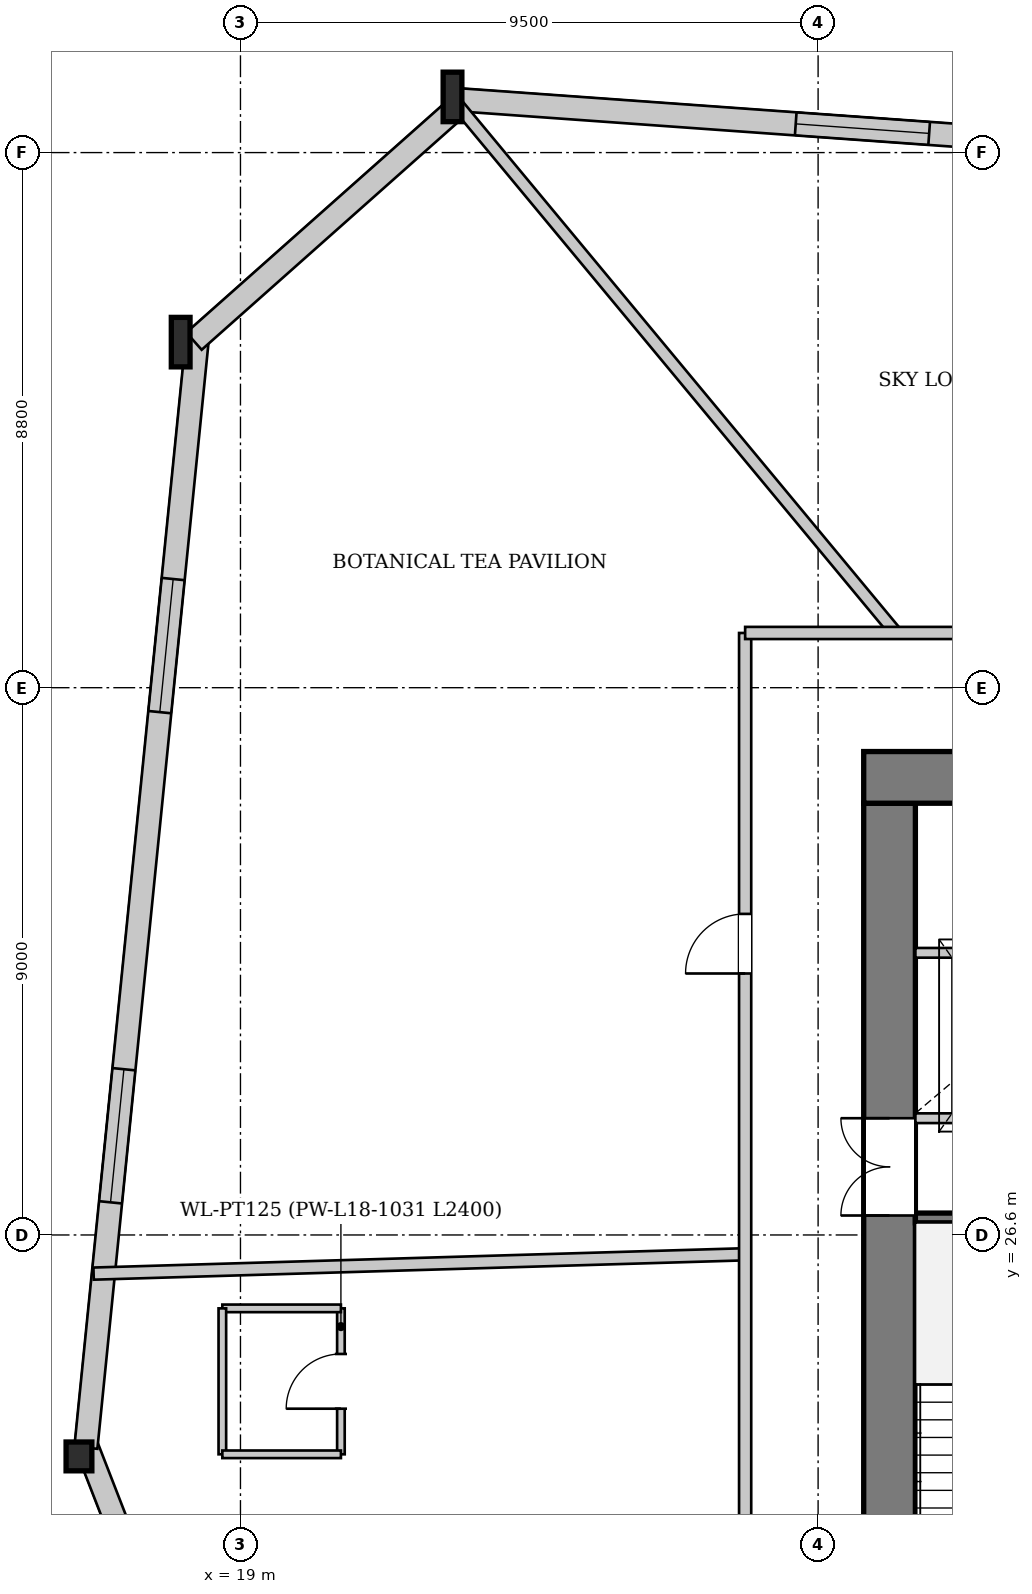
"""IFC4 building model, lengths in metres.
Left out: names, types, materials, properties, quantities, classifications, styles, units other than length and angle.
Written with IfcOpenShell. Run it as: python <this file> out.ifc"""

import sys

from ifc_helpers import new_model, si_unit, direction, frame, frame_2d, origin, origin_2d, place, context, subcontext, project, spatial, rectangle, i_section, extrude, source, transform, mapped, element, fill, save


model = new_model("IFC4")
c1 = context("Model", 3, precision=1e-05, world=origin(), true_north=direction((0.0, 1.0)))
c2 = subcontext(c1, "Body", "Model", "MODEL_VIEW")
j1 = project(units=[si_unit("LENGTHUNIT", "METRE"), si_unit("PLANEANGLEUNIT", "RADIAN")], contexts=[c1])
p1 = place(None, origin())
s1 = spatial("IfcSite", under=j1, at=p1, CompositionType="ELEMENT")
p2 = place(p1, origin())
s2 = spatial("IfcBuilding", under=s1, at=p2, CompositionType="ELEMENT")
p3 = place(p2, frame((0.0, 0.0, 71.9)))
s3 = spatial("IfcBuildingStorey", under=s2, at=p3, CompositionType="ELEMENT", Elevation=71.9)
m1 = source(origin(), c2, "Body", "SweptSolid", [
    extrude(i_section(OverallWidth=0.308, OverallDepth=0.814, WebThickness=0.021, FlangeThickness=0.04, at=origin_2d()), origin(), (0.0, 0.0, 1.0), 3.856),
])
p4 = place(p3, frame((22.632, 45.456, 0.0), z_axis=(-0.07483088436, -0.073058240738, 0.994516381065), x_axis=(0.698581004946, -0.715530977337, 0.0)))
e1 = element("IfcColumn", 1, at=p4, inside=s3, PredefinedType="COLUMN", context=c2, shape_type="MappedRepresentation", body=[
    mapped(m1, transform((0.0, 0.0, 0.0), x_axis=(1.0, 0.0, 0.0), y_axis=(0.0, 1.0, 0.0), z_axis=(0.0, 0.0, 1.0), scale=1.0)),
])
m2 = source(origin(), c2, "Body", "SweptSolid", [
    extrude(i_section(OverallWidth=0.308, OverallDepth=0.814, WebThickness=0.021, FlangeThickness=0.04, at=origin_2d()), origin(), (0.0, 0.0, 1.0), 3.853),
])
p5 = place(p3, frame((18.11, 41.441, 0.0), z_axis=(-0.048286594002, -0.082125230744, 0.995451581602), x_axis=(0.862036791627, -0.506845706188, 0.0)))
e2 = element("IfcColumn", 2, at=p5, inside=s3, PredefinedType="COLUMN", context=c2, shape_type="MappedRepresentation", body=[
    mapped(m2, transform((0.0, 0.0, 0.0), x_axis=(1.0, 0.0, 0.0), y_axis=(0.0, 1.0, 0.0), z_axis=(0.0, 0.0, 1.0), scale=1.0)),
])
m3 = source(origin(), c2, "Body", "SweptSolid", [
    extrude(i_section(OverallWidth=0.424, OverallDepth=0.474, WebThickness=0.043, FlangeThickness=0.068, at=origin_2d()), origin(), (0.0, 0.0, 1.0), 3.852),
])
p6 = place(p3, frame((16.269, 23.121, 0.0), z_axis=(0.039042769409, -0.084550412974, 0.995654001058), x_axis=(0.907879691662, 0.419230802147, 0.0)))
e3 = element("IfcColumn", 3, at=p6, inside=s3, PredefinedType="COLUMN", context=c2, shape_type="MappedRepresentation", body=[
    mapped(m3, transform((0.0, 0.0, 0.0), x_axis=(1.0, 0.0, 0.0), y_axis=(0.0, 1.0, 0.0), z_axis=(0.0, 0.0, 1.0), scale=1.0)),
])
p7 = place(p3, frame((23.116, 6.028, 0.0), z_axis=(0.0, 0.0, 1.0), x_axis=(-0.362290127774, 0.932065375023, 0.0)))
e4 = element("IfcWall", 4, at=p7, inside=s3, PredefinedType="SOLIDWALL", context=c2, shape_type="SweptSolid", body=[
    extrude(rectangle(XDim=18.412, YDim=0.38, at=frame_2d((9.206, 0.0))), origin(), (0.0, 0.0, 1.0), 3.042),
])
p8 = place(p7, frame((4.056, 0.0, 0.65)))
e5 = element("IfcOpeningElement", 5, at=p8, cuts=e4, PredefinedType="OPENING", context=c2, shape_type="SweptSolid", body=[
    extrude(rectangle(XDim=2.2, YDim=2.25, at=frame_2d((1.1, 1.125))), frame((0.0, 0.2, 0.0), z_axis=(0.0, -1.0, 0.0), x_axis=(1.0, 0.0, 0.0)), (0.0, 0.0, 1.0), 0.4),
])
p9 = place(p7, frame((12.157, 0.0, 0.65)))
e6 = element("IfcOpeningElement", 6, at=p9, cuts=e4, PredefinedType="OPENING", context=c2, shape_type="SweptSolid", body=[
    extrude(rectangle(XDim=2.2, YDim=2.25, at=frame_2d((1.1, 1.125))), frame((0.0, 0.2, 0.0), z_axis=(0.0, -1.0, 0.0), x_axis=(1.0, 0.0, 0.0)), (0.0, 0.0, 1.0), 0.4),
])
p10 = place(p3, frame((16.458, 23.102, 0.0), z_axis=(0.0, 0.0, 1.0), x_axis=(0.099977641191, 0.994989683998, 0.0)))
e7 = element("IfcWall", 7, at=p10, inside=s3, PredefinedType="SOLIDWALL", context=c2, shape_type="SweptSolid", body=[
    extrude(rectangle(XDim=18.412, YDim=0.38, at=frame_2d((9.206, 0.0))), origin(), (0.0, 0.0, 1.0), 3.042),
])
p11 = place(p10, frame((4.055, 0.0, 0.65)))
e8 = element("IfcOpeningElement", 8, at=p11, cuts=e7, PredefinedType="OPENING", context=c2, shape_type="SweptSolid", body=[
    extrude(rectangle(XDim=2.2, YDim=2.25, at=frame_2d((1.1, 1.125))), frame((0.0, 0.2, 0.0), z_axis=(0.0, -1.0, 0.0), x_axis=(1.0, 0.0, 0.0)), (0.0, 0.0, 1.0), 0.4),
])
p12 = place(p10, frame((12.157, 0.0, 0.65)))
e9 = element("IfcOpeningElement", 9, at=p12, cuts=e7, PredefinedType="OPENING", context=c2, shape_type="SweptSolid", body=[
    extrude(rectangle(XDim=2.2, YDim=2.25, at=frame_2d((1.1, 1.125))), frame((0.0, 0.2, 0.0), z_axis=(0.0, -1.0, 0.0), x_axis=(1.0, 0.0, 0.0)), (0.0, 0.0, 1.0), 0.4),
])
p13 = place(p3, frame((18.236, 41.299, 0.0), z_axis=(0.0, 0.0, 1.0), x_axis=(0.747770050528, 0.663957793488, 0.0)))
e10 = element("IfcWall", 10, at=p13, inside=s3, PredefinedType="SOLIDWALL", context=c2, shape_type="SweptSolid", body=[
    extrude(rectangle(XDim=6.047, YDim=0.38, at=frame_2d((3.024, 0.0))), origin(), (0.0, 0.0, 1.0), 3.042),
])
p14 = place(p3, frame((22.618, 45.267, 0.0), z_axis=(0.0, 0.0, 1.0), x_axis=(0.997450631022, -0.071359923443, 0.0)))
e11 = element("IfcWall", 11, at=p14, inside=s3, PredefinedType="SOLIDWALL", context=c2, shape_type="SweptSolid", body=[
    extrude(rectangle(XDim=23.672, YDim=0.38, at=frame_2d((11.836, 0.0))), origin(), (0.0, 0.0, 1.0), 3.042),
])
p15 = place(p14, frame((5.528, 0.0, 0.65)))
e12 = element("IfcOpeningElement", 12, at=p15, cuts=e11, PredefinedType="OPENING", context=c2, shape_type="SweptSolid", body=[
    extrude(rectangle(XDim=2.2, YDim=2.25, at=frame_2d((1.1, 1.125))), frame((0.0, 0.2, 0.0), z_axis=(0.0, -1.0, 0.0), x_axis=(1.0, 0.0, 0.0)), (0.0, 0.0, 1.0), 0.4),
])
p16 = place(p14, frame((15.944, 0.0, 0.65)))
e13 = element("IfcOpeningElement", 13, at=p16, cuts=e11, PredefinedType="OPENING", context=c2, shape_type="SweptSolid", body=[
    extrude(rectangle(XDim=2.2, YDim=2.25, at=frame_2d((1.1, 1.125))), frame((0.0, 0.2, 0.0), z_axis=(0.0, -1.0, 0.0), x_axis=(1.0, 0.0, 0.0)), (0.0, 0.0, 1.0), 0.4),
])
p17 = place(p3, frame((29.675, 19.5, 0.0), z_axis=(0.0, 0.0, 1.0), x_axis=(0.0, 1.0, 0.0)))
e14 = element("IfcWall", 14, at=p17, inside=s3, PredefinedType="SHEAR", context=c2, shape_type="SweptSolid", body=[
    extrude(rectangle(XDim=14.2, YDim=0.85, at=frame_2d((7.1, 0.0))), origin(), (0.0, 0.0, 1.0), 3.75),
])
p18 = place(p17, frame((7.42, 0.0, 0.0)))
e15 = element("IfcOpeningElement", 15, at=p18, cuts=e14, PredefinedType="OPENING", context=c2, shape_type="SweptSolid", body=[
    extrude(rectangle(XDim=1.6, YDim=2.2, at=frame_2d((0.8, 1.1))), frame((0.0, 0.435, 0.0), z_axis=(0.0, -1.0, 0.0), x_axis=(1.0, 0.0, 0.0)), (0.0, 0.0, 1.0), 0.87),
])
p19 = place(p3, frame((29.25, 34.125, 0.0), z_axis=(0.0, 0.0, 1.0), x_axis=(1.0, 0.0, 0.0)))
e16 = element("IfcWall", 16, at=p19, inside=s3, PredefinedType="SHEAR", context=c2, shape_type="SweptSolid", body=[
    extrude(rectangle(XDim=17.5, YDim=0.85, at=frame_2d((8.75, 0.0))), origin(), (0.0, 0.0, 1.0), 3.75),
])
p20 = place(p19, frame((1.85, 0.0, 0.0)))
e17 = element("IfcOpeningElement", 17, at=p20, cuts=e16, PredefinedType="OPENING", context=c2, shape_type="SweptSolid", body=[
    extrude(rectangle(XDim=0.95, YDim=2.1, at=frame_2d((0.475, 1.05))), frame((0.0, 0.435, 0.0), z_axis=(0.0, -1.0, 0.0), x_axis=(1.0, 0.0, 0.0)), (0.0, 0.0, 1.0), 0.87),
])
p21 = place(p19, frame((4.23, 0.0, 0.0)))
e18 = element("IfcOpeningElement", 18, at=p21, cuts=e16, PredefinedType="OPENING", context=c2, shape_type="SweptSolid", body=[
    extrude(rectangle(XDim=1.32, YDim=2.2, at=frame_2d((0.66, 1.1))), frame((0.0, 0.435, 0.0), z_axis=(0.0, -1.0, 0.0), x_axis=(1.0, 0.0, 0.0)), (0.0, 0.0, 1.0), 0.87),
])
p22 = place(p19, frame((15.3, 0.0, 0.0)))
e19 = element("IfcOpeningElement", 19, at=p22, cuts=e16, PredefinedType="OPENING", context=c2, shape_type="SweptSolid", body=[
    extrude(rectangle(XDim=0.95, YDim=2.1, at=frame_2d((0.475, 1.05))), frame((0.0, 0.435, 0.0), z_axis=(0.0, -1.0, 0.0), x_axis=(1.0, 0.0, 0.0)), (0.0, 0.0, 1.0), 0.87),
])
for number, where, z_axis, x_axis in (
    (20, (30.1, 26.88, 0.0), (0.0, 0.0, 1.0), (1.0, 0.0, 0.0)),
    (21, (30.1, 28.52, 0.0), (0.0, 0.0, 1.0), (1.0, 0.0, 0.0)),
):
    element("IfcWall", number, at=place(p3, frame(where, z_axis=z_axis, x_axis=x_axis)), inside=s3, PredefinedType="PARTITIONING", context=c2, shape_type="SweptSolid", body=[
        extrude(rectangle(XDim=3.02, YDim=0.16, at=frame_2d((1.51, 0.0))), origin(), (0.0, 0.0, 1.0), 3.75),
    ])
p23 = place(p3, frame((30.1, 31.24, 0.0), z_axis=(0.0, 0.0, 1.0), x_axis=(1.0, 0.0, 0.0)))
e22 = element("IfcWall", 22, at=p23, inside=s3, PredefinedType="PARTITIONING", context=c2, shape_type="SweptSolid", body=[
    extrude(rectangle(XDim=3.02, YDim=0.16, at=frame_2d((1.51, 0.0))), origin(), (0.0, 0.0, 1.0), 3.75),
])
p24 = place(p23, frame((0.91, 0.0, 0.0)))
e23 = element("IfcOpeningElement", 23, at=p24, cuts=e22, PredefinedType="OPENING", context=c2, shape_type="SweptSolid", body=[
    extrude(rectangle(XDim=1.2, YDim=2.2, at=frame_2d((0.6, 1.1))), frame((0.0, 0.09, 0.0), z_axis=(0.0, -1.0, 0.0), x_axis=(1.0, 0.0, 0.0)), (0.0, 0.0, 1.0), 0.18),
])
p25 = place(p3, frame((29.781, 36.5, 0.0), z_axis=(0.0, 0.0, 1.0), x_axis=(-0.638776626614, 0.769392241507, 0.0)))
e24 = element("IfcWall", 24, at=p25, inside=s3, PredefinedType="PARTITIONING", context=c2, shape_type="SweptSolid", body=[
    extrude(rectangle(XDim=11.42, YDim=0.2, at=frame_2d((5.71, 0.0))), origin(), (0.0, 0.0, 1.0), 3.245),
])
p26 = place(p3, frame((27.3, 26.282, 0.0), z_axis=(0.0, 0.0, 1.0), x_axis=(-0.999559606693, -0.029674781671, 0.0)))
e25 = element("IfcWall", 25, at=p26, inside=s3, PredefinedType="PARTITIONING", context=c2, shape_type="SweptSolid", body=[
    extrude(rectangle(XDim=10.72, YDim=0.2, at=frame_2d((5.36, 0.0))), origin(), (0.0, 0.0, 1.0), 3.75),
])
p27 = place(p3, frame((20.652, 22.993, 0.0), z_axis=(0.0, 0.0, 1.0), x_axis=(0.0, 1.0, 0.0)))
e26 = element("IfcWall", 26, at=p27, inside=s3, PredefinedType="PARTITIONING", context=c2, shape_type="SweptSolid", body=[
    extrude(rectangle(XDim=2.4, YDim=0.125, at=frame_2d((1.2, 0.0))), origin(), (0.0, 0.0, 1.0), 3.75),
])
p28 = place(p27, frame((0.75, 0.0, 0.0)))
e27 = element("IfcOpeningElement", 27, at=p28, cuts=e26, PredefinedType="OPENING", context=c2, shape_type="SweptSolid", body=[
    extrude(rectangle(XDim=0.9, YDim=2.1, at=frame_2d((0.45, 1.05))), frame((0.0, 0.073, 0.0), z_axis=(0.0, -1.0, 0.0), x_axis=(1.0, 0.0, 0.0)), (0.0, 0.0, 1.0), 0.145),
])
p29 = place(p3, frame((20.652, 25.393, 0.0), z_axis=(0.0, 0.0, 1.0), x_axis=(-1.0, 0.0, 0.0)))
e28 = element("IfcWall", 28, at=p29, inside=s3, PredefinedType="PARTITIONING", context=c2, shape_type="SweptSolid", body=[
    extrude(rectangle(XDim=1.95, YDim=0.125, at=frame_2d((0.975, 0.0))), origin(), (0.0, 0.0, 1.0), 3.75),
])
p30 = place(p3, frame((18.702, 25.393, 0.0), z_axis=(0.0, 0.0, 1.0), x_axis=(0.0, -1.0, 0.0)))
e29 = element("IfcWall", 29, at=p30, inside=s3, PredefinedType="PARTITIONING", context=c2, shape_type="SweptSolid", body=[
    extrude(rectangle(XDim=2.4, YDim=0.125, at=frame_2d((1.2, 0.0))), origin(), (0.0, 0.0, 1.0), 3.75),
])
p31 = place(p3, frame((18.702, 22.993, 0.0), z_axis=(0.0, 0.0, 1.0), x_axis=(1.0, 0.0, 0.0)))
e30 = element("IfcWall", 30, at=p31, inside=s3, PredefinedType="PARTITIONING", context=c2, shape_type="SweptSolid", body=[
    extrude(rectangle(XDim=1.95, YDim=0.125, at=frame_2d((0.975, 0.0))), origin(), (0.0, 0.0, 1.0), 3.235),
])
p32 = place(p3, frame((27.3, 16.7, 0.0), z_axis=(0.0, 0.0, 1.0), x_axis=(0.0, 1.0, 0.0)))
e31 = element("IfcWall", 31, at=p32, inside=s3, PredefinedType="PARTITIONING", context=c2, shape_type="SweptSolid", body=[
    extrude(rectangle(XDim=19.8, YDim=0.2, at=frame_2d((9.9, 0.0))), origin(), (0.0, 0.0, 1.0), 3.75),
])
p33 = place(p32, frame((14.2, 0.0, 0.0)))
e32 = element("IfcOpeningElement", 32, at=p33, cuts=e31, PredefinedType="OPENING", context=c2, shape_type="SweptSolid", body=[
    extrude(rectangle(XDim=0.98, YDim=2.15, at=frame_2d((0.49, 1.075))), frame((0.0, 0.11, 0.0), z_axis=(0.0, -1.0, 0.0), x_axis=(1.0, 0.0, 0.0)), (0.0, 0.0, 1.0), 0.22),
])
p34 = place(p32, frame((0.3, 0.0, 0.0)))
e33 = element("IfcOpeningElement", 33, at=p34, cuts=e31, PredefinedType="OPENING", context=c2, shape_type="SweptSolid", body=[
    extrude(rectangle(XDim=0.98, YDim=2.15, at=frame_2d((0.49, 1.075))), frame((0.0, 0.11, 0.0), z_axis=(0.0, -1.0, 0.0), x_axis=(1.0, 0.0, 0.0)), (0.0, 0.0, 1.0), 0.22),
])
p35 = place(p3, frame((27.3, 36.5, 0.0), z_axis=(0.0, 0.0, 1.0), x_axis=(1.0, 0.0, 0.0)))
e34 = element("IfcWall", 34, at=p35, inside=s3, PredefinedType="PARTITIONING", context=c2, shape_type="SweptSolid", body=[
    extrude(rectangle(XDim=21.4, YDim=0.2, at=frame_2d((10.7, 0.0))), origin(), (0.0, 0.0, 1.0), 3.75),
])
p36 = place(p35, frame((19.5, 0.0, 0.0)))
e35 = element("IfcOpeningElement", 35, at=p36, cuts=e34, PredefinedType="OPENING", context=c2, shape_type="SweptSolid", body=[
    extrude(rectangle(XDim=1.6, YDim=2.2, at=frame_2d((0.8, 1.1))), frame((0.0, 0.11, 0.0), z_axis=(0.0, -1.0, 0.0), x_axis=(1.0, 0.0, 0.0)), (0.0, 0.0, 1.0), 0.22),
])
p37 = place(p35, frame((6.572, 0.0, 0.0)))
e36 = element("IfcOpeningElement", 36, at=p37, cuts=e34, PredefinedType="OPENING", context=c2, shape_type="SweptSolid", body=[
    extrude(rectangle(XDim=0.98, YDim=2.15, at=frame_2d((0.49, 1.075))), frame((0.0, 0.11, 0.0), z_axis=(0.0, -1.0, 0.0), x_axis=(1.0, 0.0, 0.0)), (0.0, 0.0, 1.0), 0.22),
])
m4 = source(origin(), c2, "Body", "SweptSolid", [
    extrude(rectangle(XDim=2.2, YDim=2.25, at=frame_2d((1.1, 1.125))), frame((0.0, 0.03, 0.0), z_axis=(0.0, -1.0, 0.0), x_axis=(1.0, 0.0, 0.0)), (0.0, 0.0, 1.0), 0.06),
])
p38 = place(p11, origin())
e37 = element("IfcWindow", 37, at=p38, inside=s3, PartitioningType="SINGLE_PANEL", PredefinedType="WINDOW", context=c2, shape_type="MappedRepresentation", body=[
    mapped(m4, transform((0.0, 0.0, 0.0), x_axis=(1.0, 0.0, 0.0), y_axis=(0.0, 1.0, 0.0), z_axis=(0.0, 0.0, 1.0), scale=1.0)),
])
fill(e8, e37)
p39 = place(p12, origin())
e38 = element("IfcWindow", 38, at=p39, inside=s3, PartitioningType="SINGLE_PANEL", PredefinedType="WINDOW", context=c2, shape_type="MappedRepresentation", body=[
    mapped(m4, transform((0.0, 0.0, 0.0), x_axis=(1.0, 0.0, 0.0), y_axis=(0.0, 1.0, 0.0), z_axis=(0.0, 0.0, 1.0), scale=1.0)),
])
fill(e9, e38)
p40 = place(p15, origin())
e39 = element("IfcWindow", 39, at=p40, inside=s3, PartitioningType="SINGLE_PANEL", PredefinedType="WINDOW", context=c2, shape_type="MappedRepresentation", body=[
    mapped(m4, transform((0.0, 0.0, 0.0), x_axis=(1.0, 0.0, 0.0), y_axis=(0.0, 1.0, 0.0), z_axis=(0.0, 0.0, 1.0), scale=1.0)),
])
fill(e12, e39)
m5 = source(origin(), c2, "Body", "SweptSolid", [
    extrude(rectangle(XDim=1.6, YDim=2.2, at=frame_2d((0.8, 1.1))), frame((0.0, 0.025, 0.0), z_axis=(0.0, -1.0, 0.0), x_axis=(1.0, 0.0, 0.0)), (0.0, 0.0, 1.0), 0.05),
])
p41 = place(p18, origin())
e40 = element("IfcDoor", 40, at=p41, inside=s3, OperationType="DOUBLE_DOOR_SINGLE_SWING", PredefinedType="DOOR", context=c2, shape_type="MappedRepresentation", body=[
    mapped(m5, transform((0.0, 0.0, 0.0), x_axis=(1.0, 0.0, 0.0), y_axis=(0.0, 1.0, 0.0), z_axis=(0.0, 0.0, 1.0), scale=1.0)),
])
fill(e15, e40)
m6 = source(origin(), c2, "Body", "SweptSolid", [
    extrude(rectangle(XDim=0.9, YDim=2.1, at=frame_2d((0.45, 1.05))), frame((0.0, 0.025, 0.0), z_axis=(0.0, -1.0, 0.0), x_axis=(1.0, 0.0, 0.0)), (0.0, 0.0, 1.0), 0.05),
])
p42 = place(p28, origin())
e41 = element("IfcDoor", 41, at=p42, inside=s3, OperationType="SINGLE_SWING_LEFT", PredefinedType="DOOR", context=c2, shape_type="MappedRepresentation", body=[
    mapped(m6, transform((0.0, 0.0, 0.0), x_axis=(1.0, 0.0, 0.0), y_axis=(0.0, 1.0, 0.0), z_axis=(0.0, 0.0, 1.0), scale=1.0)),
])
fill(e27, e41)
m7 = source(origin(), c2, "Body", "SweptSolid", [
    extrude(rectangle(XDim=0.98, YDim=2.15, at=frame_2d((0.49, 1.075))), frame((0.0, 0.025, 0.0), z_axis=(0.0, -1.0, 0.0), x_axis=(1.0, 0.0, 0.0)), (0.0, 0.0, 1.0), 0.05),
])
p43 = place(p33, origin())
e42 = element("IfcDoor", 42, at=p43, inside=s3, OperationType="SINGLE_SWING_LEFT", PredefinedType="DOOR", context=c2, shape_type="MappedRepresentation", body=[
    mapped(m7, transform((0.0, 0.0, 0.0), x_axis=(1.0, 0.0, 0.0), y_axis=(0.0, 1.0, 0.0), z_axis=(0.0, 0.0, 1.0), scale=1.0)),
])
fill(e32, e42)
save(model, sys.argv[1])
